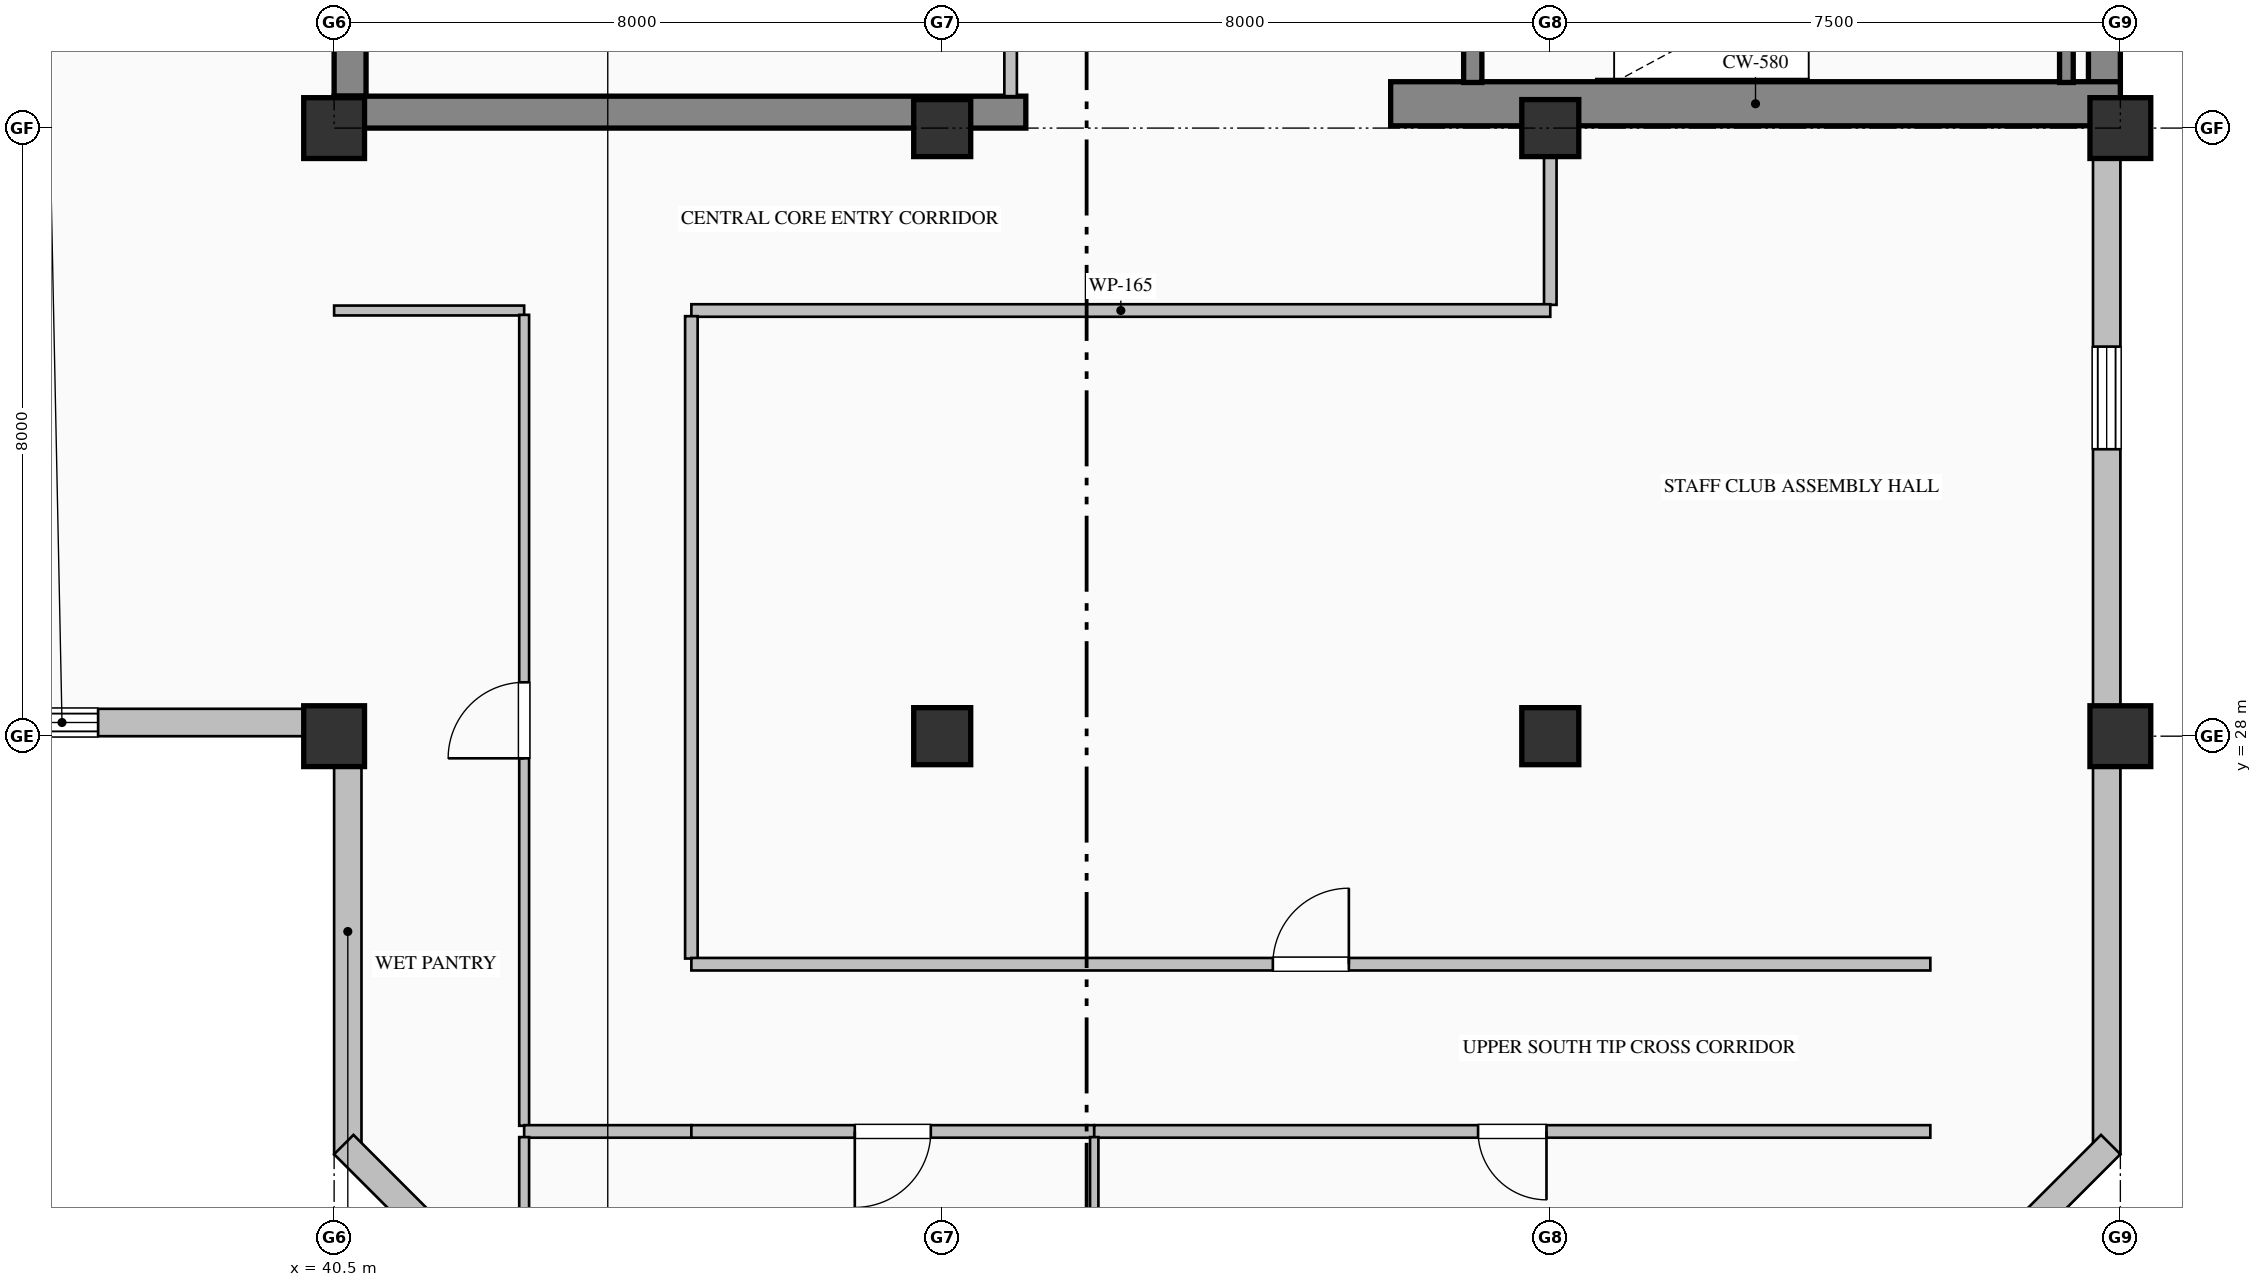
"""IFC4 building model, lengths in metres.
Left out: names, types, materials, properties, quantities, classifications, styles, units other than length and angle.
Written with IfcOpenShell. Run it as: python <this file> out.ifc"""

import sys

from ifc_helpers import new_model, si_unit, direction, frame, frame_2d, origin, origin_2d, place, context, subcontext, project, spatial, rectangle, hollow_rectangle, extrude, element, fill, save


model = new_model("IFC4")
c1 = context("Model", 3, precision=1e-05, world=origin(), true_north=direction((0.0, 1.0)))
c2 = subcontext(c1, "Body", "Model", "MODEL_VIEW")
j1 = project(units=[si_unit("LENGTHUNIT", "METRE"), si_unit("PLANEANGLEUNIT", "RADIAN")], contexts=[c1])
p1 = place(None, origin())
s1 = spatial("IfcSite", under=j1, at=p1, CompositionType="ELEMENT")
p2 = place(p1, origin())
s2 = spatial("IfcBuilding", under=s1, at=p2, CompositionType="ELEMENT")
p3 = place(p2, frame((0.0, 0.0, 319.2)))
s3 = spatial("IfcBuildingStorey", under=s2, at=p3, CompositionType="ELEMENT", Elevation=319.2)
p4 = place(p3, frame((63.79, 36.32, 0.0), z_axis=(0.0, 0.0, 1.0), x_axis=(0.0, 1.0, 0.0)))
e1 = element("IfcWall", 1, at=p4, inside=s3, PredefinedType="SHEAR", context=c2, shape_type="SweptSolid", body=[
    extrude(rectangle(XDim=15.26, YDim=0.42, at=frame_2d((7.63, 0.0))), origin(), (0.0, 0.0, 1.0), 3.785),
])
p5 = place(p3, frame((40.71, 36.42, 0.0), z_axis=(0.0, 0.0, 1.0), x_axis=(0.0, 1.0, 0.0)))
e2 = element("IfcWall", 2, at=p5, inside=s3, PredefinedType="SHEAR", context=c2, shape_type="SweptSolid", body=[
    extrude(rectangle(XDim=7.98, YDim=0.42, at=frame_2d((3.99, 0.0))), origin(), (0.0, 0.0, 1.0), 3.785),
])
p6 = place(p3, frame((40.5, 36.21, 0.0), z_axis=(0.0, 0.0, 1.0), x_axis=(1.0, 0.0, 0.0)))
e3 = element("IfcWall", 3, at=p6, inside=s3, PredefinedType="SHEAR", context=c2, shape_type="SweptSolid", body=[
    extrude(rectangle(XDim=9.1, YDim=0.42, at=frame_2d((4.55, 0.0))), origin(), (0.0, 0.0, 1.0), 3.785),
])
p7 = place(p3, frame((54.4, 36.32, 0.0), z_axis=(0.0, 0.0, 1.0), x_axis=(1.0, 0.0, 0.0)))
e4 = element("IfcWall", 4, at=p7, inside=s3, PredefinedType="SHEAR", context=c2, shape_type="SweptSolid", body=[
    extrude(rectangle(XDim=9.6, YDim=0.58, at=frame_2d((4.8, 0.0))), origin(), (0.0, 0.0, 1.0), 4.0),
])
for number, where, z_axis, x_axis in (
    (5, (40.5, 28.0, 0.0), (0.0, 0.0, 1.0), (1.0, 0.0, 0.0)),
    (6, (40.5, 36.0, 0.0), (0.0, 0.0, 1.0), (1.0, 0.0, 0.0)),
):
    element("IfcColumn", number, at=place(p3, frame(where, z_axis=z_axis, x_axis=x_axis)), inside=s3, PredefinedType="COLUMN", context=c2, shape_type="SweptSolid", body=[
        extrude(hollow_rectangle(XDim=0.8, YDim=0.8, WallThickness=0.032, at=origin_2d()), origin(), (0.0, 0.0, 1.0), 4.0),
    ])
for number, where, z_axis, x_axis in (
    (7, (48.5, 28.0, 0.0), (0.0, 0.0, 1.0), (1.0, 0.0, 0.0)),
    (8, (48.5, 36.0, 0.0), (0.0, 0.0, 1.0), (1.0, 0.0, 0.0)),
    (9, (56.5, 28.0, 0.0), (0.0, 0.0, 1.0), (1.0, 0.0, 0.0)),
    (10, (56.5, 36.0, 0.0), (0.0, 0.0, 1.0), (1.0, 0.0, 0.0)),
):
    element("IfcColumn", number, at=place(p3, frame(where, z_axis=z_axis, x_axis=x_axis)), inside=s3, PredefinedType="COLUMN", context=c2, shape_type="SweptSolid", body=[
        extrude(rectangle(XDim=0.75, YDim=0.75, at=origin_2d()), origin(), (0.0, 0.0, 1.0), 4.0),
    ])
for number, where, z_axis, x_axis in (
    (11, (64.0, 28.0, 0.0), (0.0, 0.0, 1.0), (1.0, 0.0, 0.0)),
    (12, (64.0, 36.0, 0.0), (0.0, 0.0, 1.0), (1.0, 0.0, 0.0)),
):
    element("IfcColumn", number, at=place(p3, frame(where, z_axis=z_axis, x_axis=x_axis)), inside=s3, PredefinedType="COLUMN", context=c2, shape_type="SweptSolid", body=[
        extrude(hollow_rectangle(XDim=0.8, YDim=0.8, WallThickness=0.032, at=origin_2d()), origin(), (0.0, 0.0, 1.0), 4.0),
    ])
p8 = place(p3, frame((40.68, 22.5, 0.0), z_axis=(0.0, 0.0, 1.0), x_axis=(0.0, 1.0, 0.0)))
e13 = element("IfcWall", 13, at=p8, inside=s3, PredefinedType="SOLIDWALL", context=c2, shape_type="SweptSolid", body=[
    extrude(rectangle(XDim=5.86, YDim=0.36, at=frame_2d((2.93, 0.0))), origin(), (0.0, 0.0, 1.0), 3.185),
])
p9 = place(p3, frame((40.52, 28.18, 0.0), z_axis=(0.0, 0.0, 1.0), x_axis=(-1.0, 0.0, 0.0)))
e14 = element("IfcWall", 14, at=p9, inside=s3, PredefinedType="SOLIDWALL", context=c2, shape_type="SweptSolid", body=[
    extrude(rectangle(XDim=20.02, YDim=0.36, at=frame_2d((10.01, 0.0))), origin(), (0.0, 0.0, 1.0), 3.185),
])
p10 = place(p9, frame((3.125, 0.0, 0.9)))
e15 = element("IfcOpeningElement", 15, at=p10, cuts=e14, PredefinedType="OPENING", context=c2, shape_type="SweptSolid", body=[
    extrude(rectangle(XDim=0.95, YDim=1.85, at=frame_2d((0.475, 0.925))), frame((0.0, 0.19, 0.0), z_axis=(0.0, -1.0, 0.0), x_axis=(1.0, 0.0, 0.0)), (0.0, 0.0, 1.0), 0.38),
])
p11 = place(p9, frame((10.125, 0.0, 0.9)))
e16 = element("IfcOpeningElement", 16, at=p11, cuts=e14, PredefinedType="OPENING", context=c2, shape_type="SweptSolid", body=[
    extrude(rectangle(XDim=1.35, YDim=1.85, at=frame_2d((0.675, 0.925))), frame((0.0, 0.19, 0.0), z_axis=(0.0, -1.0, 0.0), x_axis=(1.0, 0.0, 0.0)), (0.0, 0.0, 1.0), 0.38),
])
p12 = place(p9, frame((13.925, 0.0, 0.9)))
e17 = element("IfcOpeningElement", 17, at=p12, cuts=e14, PredefinedType="OPENING", context=c2, shape_type="SweptSolid", body=[
    extrude(rectangle(XDim=0.95, YDim=1.85, at=frame_2d((0.475, 0.925))), frame((0.0, 0.19, 0.0), z_axis=(0.0, -1.0, 0.0), x_axis=(1.0, 0.0, 0.0)), (0.0, 0.0, 1.0), 0.38),
])
p13 = place(p3, frame((63.82, 36.05, 0.0), z_axis=(0.0, 0.0, 1.0), x_axis=(0.0, -1.0, 0.0)))
e18 = element("IfcWall", 18, at=p13, inside=s3, PredefinedType="SOLIDWALL", context=c2, shape_type="SweptSolid", body=[
    extrude(rectangle(XDim=13.55, YDim=0.36, at=frame_2d((6.775, 0.0))), origin(), (0.0, 0.0, 1.0), 3.335),
])
p14 = place(p13, frame((2.925, 0.0, 0.9)))
e19 = element("IfcOpeningElement", 19, at=p14, cuts=e18, PredefinedType="OPENING", context=c2, shape_type="SweptSolid", body=[
    extrude(rectangle(XDim=1.35, YDim=1.85, at=frame_2d((0.675, 0.925))), frame((0.0, 0.19, 0.0), z_axis=(0.0, -1.0, 0.0), x_axis=(1.0, 0.0, 0.0)), (0.0, 0.0, 1.0), 0.38),
])
for number, where, z_axis, x_axis in (
    (20, (63.873, 22.627, 0.0), (0.0, 0.0, 1.0), (-0.707, -0.707, 0.0)),
    (21, (44.627, 18.627, 0.0), (0.0, 0.0, 1.0), (-0.707, 0.707, 0.0)),
):
    element("IfcWall", number, at=place(p3, frame(where, z_axis=z_axis, x_axis=x_axis)), inside=s3, PredefinedType="SOLIDWALL", context=c2, shape_type="SweptSolid", body=[
        extrude(rectangle(XDim=5.657, YDim=0.36, at=frame_2d((2.828, 0.0))), origin(), (0.0, 0.0, 1.0), 3.785),
    ])
p15 = place(p3, frame((55.48, 39.75, 0.0), z_axis=(0.0, 0.0, 1.0), x_axis=(0.0, -1.0, 0.0)))
e22 = element("IfcWall", 22, at=p15, inside=s3, PredefinedType="SOLIDWALL", context=c2, shape_type="SweptSolid", body=[
    extrude(rectangle(XDim=3.15, YDim=0.24, at=frame_2d((1.575, 0.0))), origin(), (0.0, 0.0, 1.0), 4.0),
])
p16 = place(p15, frame((1.0, 0.0, 0.0)))
e23 = element("IfcOpeningElement", 23, at=p16, cuts=e22, PredefinedType="OPENING", context=c2, shape_type="SweptSolid", body=[
    extrude(rectangle(XDim=1.15, YDim=2.2, at=frame_2d((0.575, 1.1))), frame((0.0, 0.13, 0.0), z_axis=(0.0, -1.0, 0.0), x_axis=(1.0, 0.0, 0.0)), (0.0, 0.0, 1.0), 0.26),
])
p17 = place(p3, frame((63.29, 36.6, 0.0), z_axis=(0.0, 0.0, 1.0), x_axis=(0.0, 1.0, 0.0)))
e24 = element("IfcWall", 24, at=p17, inside=s3, PredefinedType="SOLIDWALL", context=c2, shape_type="SweptSolid", body=[
    extrude(rectangle(XDim=3.15, YDim=0.18, at=frame_2d((1.575, 0.0))), origin(), (0.0, 0.0, 1.0), 4.0),
])
p18 = place(p3, frame((49.4, 36.42, 0.0), z_axis=(0.0, 0.0, 1.0), x_axis=(0.0, 1.0, 0.0)))
e25 = element("IfcWall", 25, at=p18, inside=s3, PredefinedType="PARTITIONING", context=c2, shape_type="SweptSolid", body=[
    extrude(rectangle(XDim=3.133, YDim=0.165, at=frame_2d((1.566, 0.0))), origin(), (0.0, 0.0, 1.0), 3.027),
])
p19 = place(p18, frame((1.066, 0.0, 0.0)))
e26 = element("IfcOpeningElement", 26, at=p19, cuts=e25, PredefinedType="OPENING", context=c2, shape_type="SweptSolid", body=[
    extrude(rectangle(XDim=1.0, YDim=2.15, at=frame_2d((0.5, 1.075))), frame((0.0, 0.093, 0.0), z_axis=(0.0, -1.0, 0.0), x_axis=(1.0, 0.0, 0.0)), (0.0, 0.0, 1.0), 0.185),
])
p20 = place(p3, frame((56.5, 36.0, 0.0), z_axis=(0.0, 0.0, 1.0), x_axis=(0.0, -1.0, 0.0)))
e27 = element("IfcWall", 27, at=p20, inside=s3, PredefinedType="PARTITIONING", context=c2, shape_type="SweptSolid", body=[
    extrude(rectangle(XDim=2.325, YDim=0.165, at=frame_2d((1.163, 0.0))), origin(), (0.0, 0.0, 1.0), 3.177),
])
p21 = place(p3, frame((56.5, 33.6, 0.0), z_axis=(0.0, 0.0, 1.0), x_axis=(-1.0, 0.0, 0.0)))
e28 = element("IfcWall", 28, at=p21, inside=s3, PredefinedType="PARTITIONING", context=c2, shape_type="SweptSolid", body=[
    extrude(rectangle(XDim=11.3, YDim=0.165, at=frame_2d((5.65, 0.0))), origin(), (0.0, 0.0, 1.0), 3.785),
])
p22 = place(p3, frame((43.0, 33.6, 0.0), z_axis=(0.0, 0.0, 1.0), x_axis=(-1.0, 0.0, 0.0)))
e29 = element("IfcWall", 29, at=p22, inside=s3, PredefinedType="PARTITIONING", context=c2, shape_type="SweptSolid", body=[
    extrude(rectangle(XDim=2.5, YDim=0.13, at=frame_2d((1.25, 0.0))), origin(), (0.0, 0.0, 1.0), 3.785),
])
p23 = place(p3, frame((45.2, 33.525, 0.0), z_axis=(0.0, 0.0, 1.0), x_axis=(0.0, -1.0, 0.0)))
e30 = element("IfcWall", 30, at=p23, inside=s3, PredefinedType="PARTITIONING", context=c2, shape_type="SweptSolid", body=[
    extrude(rectangle(XDim=8.451, YDim=0.165, at=frame_2d((4.226, 0.0))), origin(), (0.0, 0.0, 1.0), 3.785),
])
p24 = place(p3, frame((43.0, 22.875, 0.0), z_axis=(0.0, 0.0, 1.0), x_axis=(0.0, 1.0, 0.0)))
e31 = element("IfcWall", 31, at=p24, inside=s3, PredefinedType="PARTITIONING", context=c2, shape_type="SweptSolid", body=[
    extrude(rectangle(XDim=10.668, YDim=0.13, at=frame_2d((5.334, 0.0))), origin(), (0.0, 0.0, 1.0), 3.785),
])
p25 = place(p24, frame((4.834, 0.0, 0.0)))
e32 = element("IfcOpeningElement", 32, at=p25, cuts=e31, PredefinedType="OPENING", context=c2, shape_type="SweptSolid", body=[
    extrude(rectangle(XDim=1.0, YDim=2.15, at=frame_2d((0.5, 1.075))), frame((0.0, 0.075, 0.0), z_axis=(0.0, -1.0, 0.0), x_axis=(1.0, 0.0, 0.0)), (0.0, 0.0, 1.0), 0.15),
])
p26 = place(p3, frame((45.2, 22.8, 0.0), z_axis=(0.0, 0.0, 1.0), x_axis=(-1.0, 0.0, 0.0)))
e33 = element("IfcWall", 33, at=p26, inside=s3, PredefinedType="PARTITIONING", context=c2, shape_type="SweptSolid", body=[
    extrude(rectangle(XDim=2.2, YDim=0.165, at=frame_2d((1.1, 0.0))), origin(), (0.0, 0.0, 1.0), 3.785),
])
p27 = place(p3, frame((45.2, 25.0, 0.0), z_axis=(0.0, 0.0, 1.0), x_axis=(1.0, 0.0, 0.0)))
e34 = element("IfcWall", 34, at=p27, inside=s3, PredefinedType="PARTITIONING", context=c2, shape_type="SweptSolid", body=[
    extrude(rectangle(XDim=16.3, YDim=0.165, at=frame_2d((8.15, 0.0))), origin(), (0.0, 0.0, 1.0), 3.785),
])
p28 = place(p27, frame((7.65, 0.0, 0.0)))
e35 = element("IfcOpeningElement", 35, at=p28, cuts=e34, PredefinedType="OPENING", context=c2, shape_type="SweptSolid", body=[
    extrude(rectangle(XDim=1.0, YDim=2.15, at=frame_2d((0.5, 1.075))), frame((0.0, 0.093, 0.0), z_axis=(0.0, -1.0, 0.0), x_axis=(1.0, 0.0, 0.0)), (0.0, 0.0, 1.0), 0.185),
])
p29 = place(p3, frame((50.5, 22.8, 0.0), z_axis=(0.0, 0.0, 1.0), x_axis=(-1.0, 0.0, 0.0)))
e36 = element("IfcWall", 36, at=p29, inside=s3, PredefinedType="PARTITIONING", context=c2, shape_type="SweptSolid", body=[
    extrude(rectangle(XDim=5.3, YDim=0.165, at=frame_2d((2.65, 0.0))), origin(), (0.0, 0.0, 1.0), 3.785),
])
p30 = place(p29, frame((2.15, 0.0, 0.0)))
e37 = element("IfcOpeningElement", 37, at=p30, cuts=e36, PredefinedType="OPENING", context=c2, shape_type="SweptSolid", body=[
    extrude(rectangle(XDim=1.0, YDim=2.15, at=frame_2d((0.5, 1.075))), frame((0.0, 0.093, 0.0), z_axis=(0.0, -1.0, 0.0), x_axis=(1.0, 0.0, 0.0)), (0.0, 0.0, 1.0), 0.185),
])
p31 = place(p3, frame((61.5, 22.8, 0.0), z_axis=(0.0, 0.0, 1.0), x_axis=(-1.0, 0.0, 0.0)))
e38 = element("IfcWall", 38, at=p31, inside=s3, PredefinedType="PARTITIONING", context=c2, shape_type="SweptSolid", body=[
    extrude(rectangle(XDim=11.0, YDim=0.165, at=frame_2d((5.5, 0.0))), origin(), (0.0, 0.0, 1.0), 3.785),
])
p32 = place(p31, frame((5.05, 0.0, 0.0)))
e39 = element("IfcOpeningElement", 39, at=p32, cuts=e38, PredefinedType="OPENING", context=c2, shape_type="SweptSolid", body=[
    extrude(rectangle(XDim=0.9, YDim=2.15, at=frame_2d((0.45, 1.075))), frame((0.0, 0.093, 0.0), z_axis=(0.0, -1.0, 0.0), x_axis=(1.0, 0.0, 0.0)), (0.0, 0.0, 1.0), 0.185),
])
p33 = place(p3, frame((43.0, 22.726, 0.0), z_axis=(0.0, 0.0, 1.0), x_axis=(0.0, -1.0, 0.0)))
e40 = element("IfcWall", 40, at=p33, inside=s3, PredefinedType="PARTITIONING", context=c2, shape_type="SweptSolid", body=[
    extrude(rectangle(XDim=2.228, YDim=0.13, at=frame_2d((1.114, 0.0))), origin(), (0.0, 0.0, 1.0), 3.785),
])
p34 = place(p3, frame((50.5, 22.726, 0.0), z_axis=(0.0, 0.0, 1.0), x_axis=(0.0, -1.0, 0.0)))
e41 = element("IfcWall", 41, at=p34, inside=s3, PredefinedType="MOVABLE", context=c2, shape_type="SweptSolid", body=[
    extrude(rectangle(XDim=3.874, YDim=0.11, at=frame_2d((1.937, 0.0))), origin(), (0.0, 0.0, 1.0), 3.785),
])
p35 = place(p10, origin())
e42 = element("IfcWindow", 42, at=p35, inside=s3, PartitioningType="SINGLE_PANEL", PredefinedType="WINDOW", context=c2, shape_type="SweptSolid", body=[
    extrude(rectangle(XDim=0.95, YDim=1.85, at=frame_2d((0.475, 0.925))), frame((0.0, 0.15, 0.0), z_axis=(0.0, -1.0, 0.0), x_axis=(1.0, 0.0, 0.0)), (0.0, 0.0, 1.0), 0.06),
])
fill(e15, e42)
p36 = place(p14, origin())
e43 = element("IfcWindow", 43, at=p36, inside=s3, PartitioningType="DOUBLE_PANEL_VERTICAL", PredefinedType="WINDOW", context=c2, shape_type="SweptSolid", body=[
    extrude(rectangle(XDim=1.35, YDim=1.85, at=frame_2d((0.675, 0.925))), frame((0.0, 0.15, 0.0), z_axis=(0.0, -1.0, 0.0), x_axis=(1.0, 0.0, 0.0)), (0.0, 0.0, 1.0), 0.06),
])
fill(e19, e43)
p37 = place(p28, origin())
e44 = element("IfcDoor", 44, at=p37, inside=s3, OperationType="SINGLE_SWING_RIGHT", PredefinedType="DOOR", context=c2, shape_type="SweptSolid", body=[
    extrude(rectangle(XDim=1.0, YDim=2.15, at=frame_2d((0.5, 1.075))), frame((0.0, 0.025, 0.0), z_axis=(0.0, -1.0, 0.0), x_axis=(1.0, 0.0, 0.0)), (0.0, 0.0, 1.0), 0.05),
])
fill(e35, e44)
p38 = place(p25, origin())
e45 = element("IfcDoor", 45, at=p38, inside=s3, OperationType="SINGLE_SWING_LEFT", PredefinedType="DOOR", context=c2, shape_type="SweptSolid", body=[
    extrude(rectangle(XDim=1.0, YDim=2.15, at=frame_2d((0.5, 1.075))), frame((0.0, 0.025, 0.0), z_axis=(0.0, -1.0, 0.0), x_axis=(1.0, 0.0, 0.0)), (0.0, 0.0, 1.0), 0.05),
])
fill(e32, e45)
p39 = place(p30, origin())
e46 = element("IfcDoor", 46, at=p39, inside=s3, OperationType="SINGLE_SWING_RIGHT", PredefinedType="DOOR", context=c2, shape_type="SweptSolid", body=[
    extrude(rectangle(XDim=1.0, YDim=2.15, at=frame_2d((0.5, 1.075))), frame((0.0, 0.025, 0.0), z_axis=(0.0, -1.0, 0.0), x_axis=(1.0, 0.0, 0.0)), (0.0, 0.0, 1.0), 0.05),
])
fill(e37, e46)
p40 = place(p32, origin())
e47 = element("IfcDoor", 47, at=p40, inside=s3, OperationType="SINGLE_SWING_LEFT", PredefinedType="DOOR", context=c2, shape_type="SweptSolid", body=[
    extrude(rectangle(XDim=0.9, YDim=2.15, at=frame_2d((0.45, 1.075))), frame((0.0, 0.025, 0.0), z_axis=(0.0, -1.0, 0.0), x_axis=(1.0, 0.0, 0.0)), (0.0, 0.0, 1.0), 0.05),
])
fill(e39, e47)
save(model, sys.argv[1])
